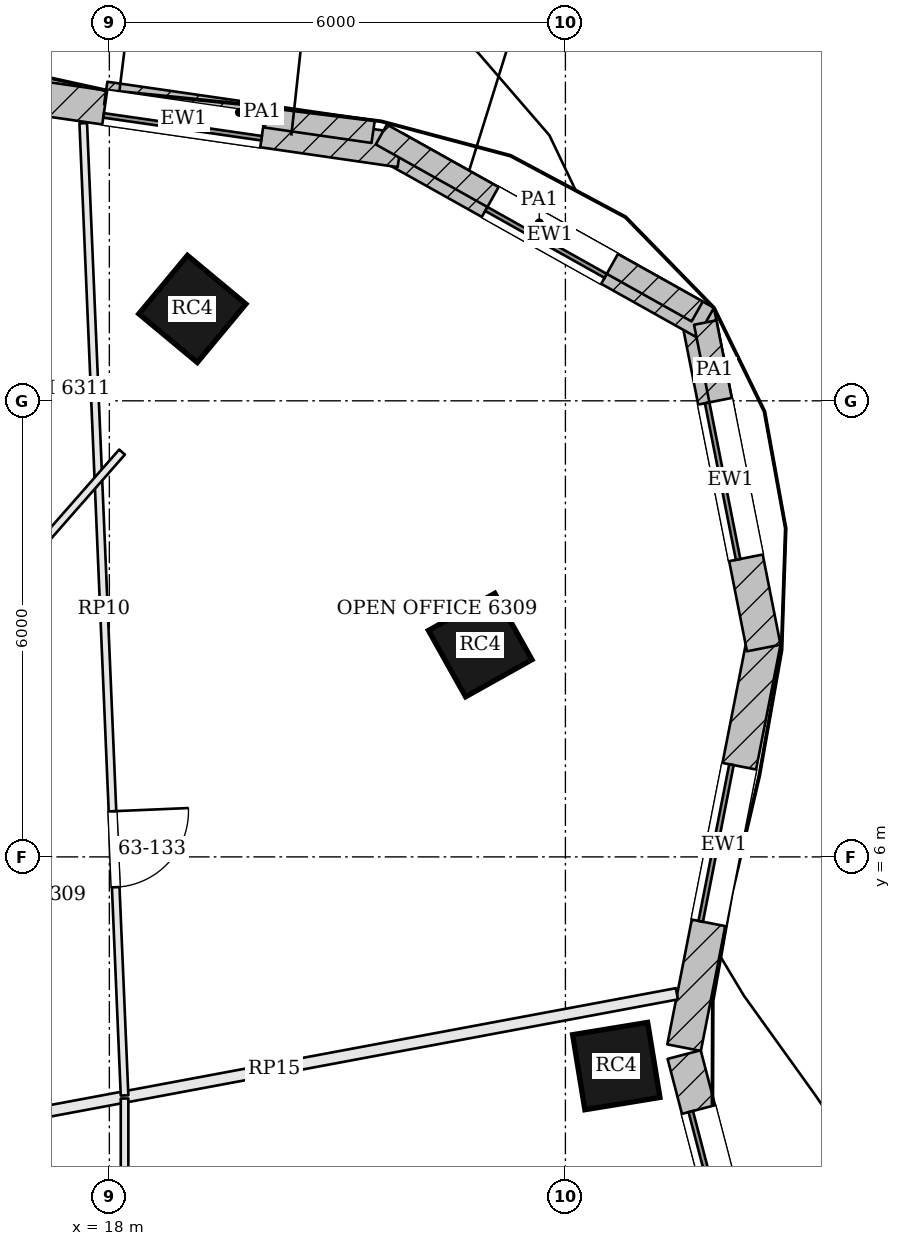
"""IFC4 building model, lengths in metres.
Left out: names, types, materials, properties, quantities, classifications, styles, units other than length and angle.
Written with IfcOpenShell. Run it as: python <this file> out.ifc"""

import sys

from ifc_helpers import new_model, si_unit, direction, frame, frame_2d, origin, origin_2d, place, context, subcontext, project, spatial, rectangle, extrude, element, fill, save


model = new_model("IFC4")
c1 = context("Model", 3, precision=1e-05, world=origin(), true_north=direction((0.0, 1.0)))
c2 = subcontext(c1, "Body", "Model", "MODEL_VIEW")
j1 = project(units=[si_unit("LENGTHUNIT", "METRE"), si_unit("PLANEANGLEUNIT", "RADIAN")], contexts=[c1])
p1 = place(None, origin())
s1 = spatial("IfcSite", under=j1, at=p1, CompositionType="ELEMENT")
p2 = place(p1, origin())
s2 = spatial("IfcBuilding", under=s1, at=p2, CompositionType="ELEMENT")
p3 = place(p2, frame((0.0, 0.0, 256.5)))
s3 = spatial("IfcBuildingStorey", under=s2, at=p3, CompositionType="ELEMENT", Elevation=256.5)
for number, where, z_axis, x_axis in (
    (1, (24.669, 3.248, 0.0), (0.0, 0.0, 1.0), (-0.162, 0.987, 0.0)),
    (2, (22.879, 8.787, 0.0), (0.0, 0.0, 1.0), (-0.489, 0.873, 0.0)),
    (3, (19.092, 13.209, 0.0), (0.0, 0.0, 1.0), (-0.769, 0.639, 0.0)),
):
    element("IfcColumn", number, at=place(p3, frame(where, z_axis=z_axis, x_axis=x_axis)), inside=s3, PredefinedType="COLUMN", context=c2, shape_type="SweptSolid", body=[
        extrude(rectangle(XDim=1.0, YDim=1.0, at=origin_2d()), origin(), (0.0, 0.0, 1.0), 3.9),
    ])
p4 = place(p3, frame((26.469, -0.079, 0.0), z_axis=(0.0, 0.0, 1.0), x_axis=(-0.252446779859, 0.967610780913, 0.0)))
e4 = element("IfcWall", 4, at=p4, inside=s3, PredefinedType="SOLIDWALL", context=c2, shape_type="SweptSolid", body=[
    extrude(rectangle(XDim=3.595, YDim=0.45, at=frame_2d((1.797, 0.0))), origin(), (0.0, 0.0, 1.0), 3.7),
])
p5 = place(p4, frame((0.747, 0.0, 0.9)))
e5 = element("IfcOpeningElement", 5, at=p5, cuts=e4, PredefinedType="OPENING", context=c2, shape_type="SweptSolid", body=[
    extrude(rectangle(XDim=2.1, YDim=2.3, at=frame_2d((1.05, 1.15))), frame((0.0, 0.235, 0.0), z_axis=(0.0, -1.0, 0.0), x_axis=(1.0, 0.0, 0.0)), (0.0, 0.0, 1.0), 0.47),
])
p6 = place(p3, frame((25.561, 3.49, 0.0), z_axis=(0.0, 0.0, 1.0), x_axis=(0.192494026297, 0.981298145234, 0.0)))
e6 = element("IfcWall", 6, at=p6, inside=s3, PredefinedType="SOLIDWALL", context=c2, shape_type="SweptSolid", body=[
    extrude(rectangle(XDim=5.446, YDim=0.45, at=frame_2d((2.723, 0.0))), origin(), (0.0, 0.0, 1.0), 3.7),
])
p7 = place(p6, frame((1.673, 0.0, 0.9)))
e7 = element("IfcOpeningElement", 7, at=p7, cuts=e6, PredefinedType="OPENING", context=c2, shape_type="SweptSolid", body=[
    extrude(rectangle(XDim=2.1, YDim=2.3, at=frame_2d((1.05, 1.15))), frame((0.0, 0.235, 0.0), z_axis=(0.0, -1.0, 0.0), x_axis=(1.0, 0.0, 0.0)), (0.0, 0.0, 1.0), 0.47),
])
p8 = place(p3, frame((26.61, 8.748, 0.0), z_axis=(0.0, 0.0, 1.0), x_axis=(-0.193923166402, 0.981016720312, 0.0)))
e8 = element("IfcWall", 8, at=p8, inside=s3, PredefinedType="SOLIDWALL", context=c2, shape_type="SweptSolid", body=[
    extrude(rectangle(XDim=4.518, YDim=0.45, at=frame_2d((2.259, 0.0))), origin(), (0.0, 0.0, 1.0), 3.7),
])
p9 = place(p8, frame((1.209, 0.0, 0.9)))
e9 = element("IfcOpeningElement", 9, at=p9, cuts=e8, PredefinedType="OPENING", context=c2, shape_type="SweptSolid", body=[
    extrude(rectangle(XDim=2.1, YDim=2.3, at=frame_2d((1.05, 1.15))), frame((0.0, 0.235, 0.0), z_axis=(0.0, -1.0, 0.0), x_axis=(1.0, 0.0, 0.0)), (0.0, 0.0, 1.0), 0.47),
])
p10 = place(p3, frame((25.844, 13.028, 0.0), z_axis=(0.0, 0.0, 1.0), x_axis=(-0.872346398261, 0.488888291373, 0.0)))
e10 = element("IfcWall", 10, at=p10, inside=s3, PredefinedType="SOLIDWALL", context=c2, shape_type="SweptSolid", body=[
    extrude(rectangle(XDim=4.696, YDim=0.45, at=frame_2d((2.348, 0.0))), origin(), (0.0, 0.0, 1.0), 3.7),
])
p11 = place(p10, frame((1.448, 0.0, 0.9)))
e11 = element("IfcOpeningElement", 11, at=p11, cuts=e10, PredefinedType="OPENING", context=c2, shape_type="SweptSolid", body=[
    extrude(rectangle(XDim=1.8, YDim=2.3, at=frame_2d((0.9, 1.15))), frame((0.0, 0.235, 0.0), z_axis=(0.0, -1.0, 0.0), x_axis=(1.0, 0.0, 0.0)), (0.0, 0.0, 1.0), 0.47),
])
p12 = place(p3, frame((21.825, 15.297, 0.0), z_axis=(0.0, 0.0, 1.0), x_axis=(-0.98971474215, 0.143054986527, 0.0)))
e12 = element("IfcWall", 12, at=p12, inside=s3, PredefinedType="SOLIDWALL", context=c2, shape_type="SweptSolid", body=[
    extrude(rectangle(XDim=5.753, YDim=0.45, at=frame_2d((2.876, 0.0))), origin(), (0.0, 0.0, 1.0), 3.7),
])
p13 = place(p12, frame((1.826, 0.0, 0.9)))
e13 = element("IfcOpeningElement", 13, at=p13, cuts=e12, PredefinedType="OPENING", context=c2, shape_type="SweptSolid", body=[
    extrude(rectangle(XDim=2.1, YDim=2.3, at=frame_2d((1.05, 1.15))), frame((0.0, 0.235, 0.0), z_axis=(0.0, -1.0, 0.0), x_axis=(1.0, 0.0, 0.0)), (0.0, 0.0, 1.0), 0.47),
])
p14 = place(p3, frame((26.084, 11.792, 3.9), z_axis=(0.0, 0.0, 1.0), x_axis=(-0.193846183911, 0.981031934742, 0.0)))
e14 = element("IfcWall", 14, at=p14, inside=s3, PredefinedType="PARAPET", context=c2, shape_type="SweptSolid", body=[
    extrude(rectangle(XDim=1.262, YDim=0.3, at=frame_2d((0.631, 0.0))), origin(), (0.0, 0.0, 1.0), 1.1),
])
p15 = place(p3, frame((25.734, 13.176, 3.9), z_axis=(0.0, 0.0, 1.0), x_axis=(-0.872345142407, 0.488890532245, 0.0)))
e15 = element("IfcWall", 15, at=p15, inside=s3, PredefinedType="PARAPET", context=c2, shape_type="SweptSolid", body=[
    extrude(rectangle(XDim=4.763, YDim=0.3, at=frame_2d((2.381, 0.0))), origin(), (0.0, 0.0, 1.0), 1.1),
])
p16 = place(p3, frame((21.471, 15.541, 3.9), z_axis=(0.0, 0.0, 1.0), x_axis=(-0.989713234374, 0.143065417571, 0.0)))
e16 = element("IfcWall", 16, at=p16, inside=s3, PredefinedType="PARAPET", context=c2, shape_type="SweptSolid", body=[
    extrude(rectangle(XDim=3.555, YDim=0.3, at=frame_2d((1.777, 0.0))), origin(), (0.0, 0.0, 1.0), 1.1),
])
p17 = place(p3, frame((25.467, 4.199, 0.0), z_axis=(0.0, 0.0, 1.0), x_axis=(-0.982996865326, -0.183622337308, 0.0)))
e17 = element("IfcWall", 17, at=p17, inside=s3, PredefinedType="PARTITIONING", context=c2, shape_type="SweptSolid", body=[
    extrude(rectangle(XDim=10.776, YDim=0.15, at=frame_2d((5.388, 0.0))), origin(), (0.0, 0.0, 1.0), 3.084),
])
p18 = place(p3, frame((18.2, 2.821, 0.0), z_axis=(0.0, 0.0, 1.0), x_axis=(0.0, -1.0, 0.0)))
e18 = element("IfcWall", 18, at=p18, inside=s3, PredefinedType="PARTITIONING", context=c2, shape_type="SweptSolid", body=[
    extrude(rectangle(XDim=11.021, YDim=0.1, at=frame_2d((5.511, 0.0))), origin(), (0.0, 0.0, 1.0), 3.084),
])
p19 = place(p3, frame((17.656, 15.652, 0.0), z_axis=(0.0, 0.0, 1.0), x_axis=(0.042451532229, -0.999098527379, 0.0)))
e19 = element("IfcWall", 19, at=p19, inside=s3, PredefinedType="PARTITIONING", context=c2, shape_type="SweptSolid", body=[
    extrude(rectangle(XDim=12.802, YDim=0.1, at=frame_2d((6.401, 0.0))), origin(), (0.0, 0.0, 1.0), 3.084),
])
p20 = place(p19, frame((9.06, 0.0, 0.0)))
e20 = element("IfcOpeningElement", 20, at=p20, cuts=e19, PredefinedType="OPENING", context=c2, shape_type="SweptSolid", body=[
    extrude(rectangle(XDim=1.0, YDim=2.1, at=frame_2d((0.5, 1.05))), frame((0.0, 0.06, 0.0), z_axis=(0.0, -1.0, 0.0), x_axis=(1.0, 0.0, 0.0)), (0.0, 0.0, 1.0), 0.12),
])
p21 = place(p3, frame((14.85, 7.547, 0.0), z_axis=(0.0, 0.0, 1.0), x_axis=(0.659758375042, 0.751477801776, 0.0)))
e21 = element("IfcWall", 21, at=p21, inside=s3, PredefinedType="PARTITIONING", context=c2, shape_type="SweptSolid", body=[
    extrude(rectangle(XDim=5.028, YDim=0.1, at=frame_2d((2.514, 0.0))), origin(), (0.0, 0.0, 1.0), 3.084),
])
p22 = place(p5, origin())
e22 = element("IfcWindow", 22, at=p22, inside=s3, PartitioningType="SINGLE_PANEL", PredefinedType="WINDOW", context=c2, shape_type="SweptSolid", body=[
    extrude(rectangle(XDim=2.1, YDim=2.3, at=frame_2d((1.05, 1.15))), frame((0.0, 0.135, 0.0), z_axis=(0.0, -1.0, 0.0), x_axis=(1.0, 0.0, 0.0)), (0.0, 0.0, 1.0), 0.06),
])
fill(e5, e22)
p23 = place(p7, origin())
e23 = element("IfcWindow", 23, at=p23, inside=s3, PartitioningType="SINGLE_PANEL", PredefinedType="WINDOW", context=c2, shape_type="SweptSolid", body=[
    extrude(rectangle(XDim=2.1, YDim=2.3, at=frame_2d((1.05, 1.15))), frame((0.0, 0.135, 0.0), z_axis=(0.0, -1.0, 0.0), x_axis=(1.0, 0.0, 0.0)), (0.0, 0.0, 1.0), 0.06),
])
fill(e7, e23)
p24 = place(p9, origin())
e24 = element("IfcWindow", 24, at=p24, inside=s3, PartitioningType="SINGLE_PANEL", PredefinedType="WINDOW", context=c2, shape_type="SweptSolid", body=[
    extrude(rectangle(XDim=2.1, YDim=2.3, at=frame_2d((1.05, 1.15))), frame((0.0, 0.135, 0.0), z_axis=(0.0, -1.0, 0.0), x_axis=(1.0, 0.0, 0.0)), (0.0, 0.0, 1.0), 0.06),
])
fill(e9, e24)
p25 = place(p11, origin())
e25 = element("IfcWindow", 25, at=p25, inside=s3, PartitioningType="SINGLE_PANEL", PredefinedType="WINDOW", context=c2, shape_type="SweptSolid", body=[
    extrude(rectangle(XDim=1.8, YDim=2.3, at=frame_2d((0.9, 1.15))), frame((0.0, 0.135, 0.0), z_axis=(0.0, -1.0, 0.0), x_axis=(1.0, 0.0, 0.0)), (0.0, 0.0, 1.0), 0.06),
])
fill(e11, e25)
p26 = place(p13, origin())
e26 = element("IfcWindow", 26, at=p26, inside=s3, PartitioningType="SINGLE_PANEL", PredefinedType="WINDOW", context=c2, shape_type="SweptSolid", body=[
    extrude(rectangle(XDim=2.1, YDim=2.3, at=frame_2d((1.05, 1.15))), frame((0.0, 0.135, 0.0), z_axis=(0.0, -1.0, 0.0), x_axis=(1.0, 0.0, 0.0)), (0.0, 0.0, 1.0), 0.06),
])
fill(e13, e26)
p27 = place(p20, origin())
e27 = element("IfcDoor", 27, at=p27, inside=s3, OperationType="SINGLE_SWING_LEFT", PredefinedType="DOOR", context=c2, shape_type="SweptSolid", body=[
    extrude(rectangle(XDim=1.0, YDim=2.1, at=frame_2d((0.5, 1.05))), frame((0.0, 0.025, 0.0), z_axis=(0.0, -1.0, 0.0), x_axis=(1.0, 0.0, 0.0)), (0.0, 0.0, 1.0), 0.05),
])
fill(e20, e27)
save(model, sys.argv[1])
